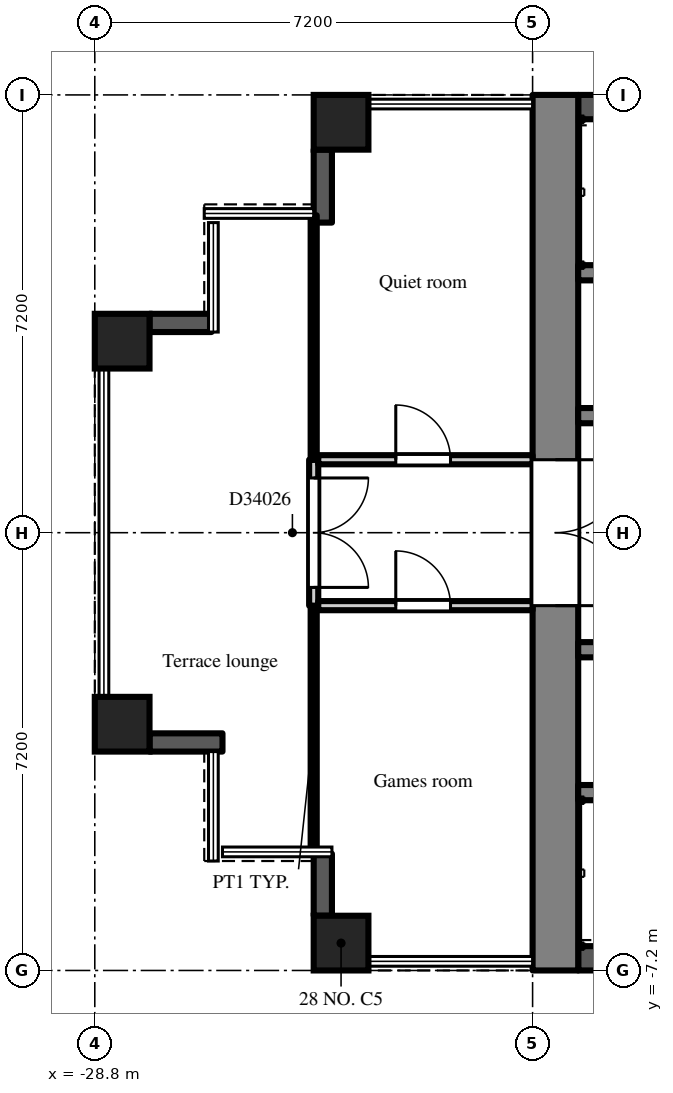
"""IFC4 building model, lengths in metres.
Left out: names, types, materials, properties, quantities, classifications, styles, units other than length and angle.
Written with IfcOpenShell. Run it as: python <this file> out.ifc"""

import sys

from ifc_helpers import new_model, si_unit, direction, frame, frame_2d, origin, origin_2d, place, context, subcontext, project, spatial, rectangle, extrude, element, fill, save


model = new_model("IFC4")
c1 = context("Model", 3, precision=1e-05, world=origin(), true_north=direction((0.0, 1.0)))
c2 = subcontext(c1, "Body", "Model", "MODEL_VIEW")
j1 = project(units=[si_unit("LENGTHUNIT", "METRE"), si_unit("PLANEANGLEUNIT", "RADIAN")], contexts=[c1])
p1 = place(None, origin())
s1 = spatial("IfcSite", under=j1, at=p1, CompositionType="ELEMENT")
p2 = place(p1, origin())
s2 = spatial("IfcBuilding", under=s1, at=p2, CompositionType="ELEMENT")
p3 = place(p2, frame((0.0, 0.0, 237.9)))
s3 = spatial("IfcBuildingStorey", under=s2, at=p3, CompositionType="ELEMENT", Elevation=237.9)
for number, where, z_axis, x_axis in (
    (1, (-28.35, -3.15, 0.0), (0.0, 0.0, 1.0), (1.0, 0.0, 0.0)),
    (2, (-28.35, 3.15, 0.0), (0.0, 0.0, 1.0), (1.0, 0.0, 0.0)),
    (3, (-24.75, -6.75, 0.0), (0.0, 0.0, 1.0), (1.0, 0.0, 0.0)),
    (4, (-24.75, 6.75, 0.0), (0.0, 0.0, 1.0), (1.0, 0.0, 0.0)),
):
    element("IfcColumn", number, at=place(p3, frame(where, z_axis=z_axis, x_axis=x_axis)), inside=s3, PredefinedType="COLUMN", context=c2, shape_type="SweptSolid", body=[
        extrude(rectangle(XDim=0.9, YDim=0.9, at=origin_2d()), origin(), (0.0, 0.0, 1.0), 4.2),
    ])
p4 = place(p3, frame((-25.05, 6.3, 0.0), z_axis=(0.0, 0.0, 1.0), x_axis=(0.0, -1.0, 0.0)))
e5 = element("IfcWall", 5, at=p4, inside=s3, PredefinedType="SOLIDWALL", context=c2, shape_type="SweptSolid", body=[
    extrude(rectangle(XDim=1.2, YDim=0.3, at=frame_2d((0.6, 0.0))), origin(), (0.0, 0.0, 1.0), 3.75),
])
p5 = place(p3, frame((-26.88, 3.45, 0.0), z_axis=(0.0, 0.0, 1.0), x_axis=(-1.0, 0.0, 0.0)))
e6 = element("IfcWall", 6, at=p5, inside=s3, PredefinedType="SOLIDWALL", context=c2, shape_type="SweptSolid", body=[
    extrude(rectangle(XDim=1.02, YDim=0.3, at=frame_2d((0.51, 0.0))), origin(), (0.0, 0.0, 1.0), 3.75),
])
p6 = place(p3, frame((-27.9, -3.45, 0.0), z_axis=(0.0, 0.0, 1.0), x_axis=(1.0, 0.0, 0.0)))
e7 = element("IfcWall", 7, at=p6, inside=s3, PredefinedType="SOLIDWALL", context=c2, shape_type="SweptSolid", body=[
    extrude(rectangle(XDim=1.2, YDim=0.3, at=frame_2d((0.6, 0.0))), origin(), (0.0, 0.0, 1.0), 3.75),
])
p7 = place(p3, frame((-25.05, -5.28, 0.0), z_axis=(0.0, 0.0, 1.0), x_axis=(0.0, -1.0, 0.0)))
e8 = element("IfcWall", 8, at=p7, inside=s3, PredefinedType="SOLIDWALL", context=c2, shape_type="SweptSolid", body=[
    extrude(rectangle(XDim=1.02, YDim=0.3, at=frame_2d((0.51, 0.0))), origin(), (0.0, 0.0, 1.0), 3.75),
])
p8 = place(p3, frame((-21.225, -7.2, 0.0), z_axis=(0.0, 0.0, 1.0), x_axis=(0.0, 1.0, 0.0)))
e9 = element("IfcWall", 9, at=p8, inside=s3, PredefinedType="SHEAR", context=c2, shape_type="SweptSolid", body=[
    extrude(rectangle(XDim=14.4, YDim=0.75, at=frame_2d((7.2, 0.0))), origin(), (0.0, 0.0, 1.0), 3.75),
])
p9 = place(p8, frame((6.0, 0.0, 0.0)))
e10 = element("IfcOpeningElement", 10, at=p9, cuts=e9, PredefinedType="OPENING", context=c2, shape_type="SweptSolid", body=[
    extrude(rectangle(XDim=2.4, YDim=2.2, at=frame_2d((1.2, 1.1))), frame((0.0, 0.385, 0.0), z_axis=(0.0, -1.0, 0.0), x_axis=(1.0, 0.0, 0.0)), (0.0, 0.0, 1.0), 0.77),
])
p10 = place(p3, frame((-7.9, 7.0, 0.0), z_axis=(0.0, 0.0, 1.0), x_axis=(-1.0, 0.0, 0.0)))
e11 = element("IfcWall", 11, at=p10, inside=s3, PredefinedType="SHEAR", context=c2, shape_type="SweptSolid", body=[
    extrude(rectangle(XDim=12.95, YDim=0.4, at=frame_2d((6.475, 0.0))), origin(), (0.0, 0.0, 1.0), 3.75),
])
p11 = place(p3, frame((-7.9, 1.925, 0.0), z_axis=(0.0, 0.0, 1.0), x_axis=(-1.0, 0.0, 0.0)))
e12 = element("IfcWall", 12, at=p11, inside=s3, PredefinedType="SHEAR", context=c2, shape_type="SweptSolid", body=[
    extrude(rectangle(XDim=12.95, YDim=0.25, at=frame_2d((6.475, 0.0))), origin(), (0.0, 0.0, 1.0), 3.75),
])
p12 = place(p11, frame((4.825, 0.0, 0.0)))
e13 = element("IfcOpeningElement", 13, at=p12, cuts=e12, PredefinedType="OPENING", context=c2, shape_type="SweptSolid", body=[
    extrude(rectangle(XDim=1.1, YDim=2.1, at=frame_2d((0.55, 1.05))), frame((0.0, 0.135, 0.0), z_axis=(0.0, -1.0, 0.0), x_axis=(1.0, 0.0, 0.0)), (0.0, 0.0, 1.0), 0.27),
])
p13 = place(p11, frame((7.025, 0.0, 0.0)))
e14 = element("IfcOpeningElement", 14, at=p13, cuts=e12, PredefinedType="OPENING", context=c2, shape_type="SweptSolid", body=[
    extrude(rectangle(XDim=1.1, YDim=2.1, at=frame_2d((0.55, 1.05))), frame((0.0, 0.135, 0.0), z_axis=(0.0, -1.0, 0.0), x_axis=(1.0, 0.0, 0.0)), (0.0, 0.0, 1.0), 0.27),
])
p14 = place(p11, frame((9.225, 0.0, 0.0)))
e15 = element("IfcOpeningElement", 15, at=p14, cuts=e12, PredefinedType="OPENING", context=c2, shape_type="SweptSolid", body=[
    extrude(rectangle(XDim=1.1, YDim=2.1, at=frame_2d((0.55, 1.05))), frame((0.0, 0.135, 0.0), z_axis=(0.0, -1.0, 0.0), x_axis=(1.0, 0.0, 0.0)), (0.0, 0.0, 1.0), 0.27),
])
p15 = place(p11, frame((0.525, 0.0, 0.0)))
e16 = element("IfcOpeningElement", 16, at=p15, cuts=e12, PredefinedType="OPENING", context=c2, shape_type="SweptSolid", body=[
    extrude(rectangle(XDim=0.9, YDim=2.1, at=frame_2d((0.45, 1.05))), frame((0.0, 0.135, 0.0), z_axis=(0.0, -1.0, 0.0), x_axis=(1.0, 0.0, 0.0)), (0.0, 0.0, 1.0), 0.27),
])
p16 = place(p11, frame((2.575, 0.0, 0.0)))
e17 = element("IfcOpeningElement", 17, at=p16, cuts=e12, PredefinedType="OPENING", context=c2, shape_type="SweptSolid", body=[
    extrude(rectangle(XDim=1.2, YDim=2.1, at=frame_2d((0.6, 1.05))), frame((0.0, 0.135, 0.0), z_axis=(0.0, -1.0, 0.0), x_axis=(1.0, 0.0, 0.0)), (0.0, 0.0, 1.0), 0.27),
])
p17 = place(p11, frame((11.525, 0.0, 0.0)))
e18 = element("IfcOpeningElement", 18, at=p17, cuts=e12, PredefinedType="OPENING", context=c2, shape_type="SweptSolid", body=[
    extrude(rectangle(XDim=0.9, YDim=2.1, at=frame_2d((0.45, 1.05))), frame((0.0, 0.135, 0.0), z_axis=(0.0, -1.0, 0.0), x_axis=(1.0, 0.0, 0.0)), (0.0, 0.0, 1.0), 0.27),
])
p18 = place(p3, frame((-12.3, 4.275, 0.0), z_axis=(0.0, 0.0, 1.0), x_axis=(-1.0, 0.0, 0.0)))
e19 = element("IfcWall", 19, at=p18, inside=s3, PredefinedType="SHEAR", context=c2, shape_type="SweptSolid", body=[
    extrude(rectangle(XDim=8.55, YDim=0.25, at=frame_2d((4.275, 0.0))), origin(), (0.0, 0.0, 1.0), 3.75),
])
p19 = place(p3, frame((-7.9, -7.0, 0.0), z_axis=(0.0, 0.0, 1.0), x_axis=(-1.0, 0.0, 0.0)))
e20 = element("IfcWall", 20, at=p19, inside=s3, PredefinedType="SHEAR", context=c2, shape_type="SweptSolid", body=[
    extrude(rectangle(XDim=12.95, YDim=0.4, at=frame_2d((6.475, 0.0))), origin(), (0.0, 0.0, 1.0), 3.75),
])
p20 = place(p3, frame((-7.9, -1.925, 0.0), z_axis=(0.0, 0.0, 1.0), x_axis=(-1.0, 0.0, 0.0)))
e21 = element("IfcWall", 21, at=p20, inside=s3, PredefinedType="SHEAR", context=c2, shape_type="SweptSolid", body=[
    extrude(rectangle(XDim=12.95, YDim=0.25, at=frame_2d((6.475, 0.0))), origin(), (0.0, 0.0, 1.0), 3.75),
])
p21 = place(p20, frame((0.525, 0.0, 0.0)))
e22 = element("IfcOpeningElement", 22, at=p21, cuts=e21, PredefinedType="OPENING", context=c2, shape_type="SweptSolid", body=[
    extrude(rectangle(XDim=0.9, YDim=2.1, at=frame_2d((0.45, 1.05))), frame((0.0, 0.135, 0.0), z_axis=(0.0, -1.0, 0.0), x_axis=(1.0, 0.0, 0.0)), (0.0, 0.0, 1.0), 0.27),
])
p22 = place(p20, frame((2.575, 0.0, 0.0)))
e23 = element("IfcOpeningElement", 23, at=p22, cuts=e21, PredefinedType="OPENING", context=c2, shape_type="SweptSolid", body=[
    extrude(rectangle(XDim=1.2, YDim=2.1, at=frame_2d((0.6, 1.05))), frame((0.0, 0.135, 0.0), z_axis=(0.0, -1.0, 0.0), x_axis=(1.0, 0.0, 0.0)), (0.0, 0.0, 1.0), 0.27),
])
p23 = place(p20, frame((6.025, 0.0, 0.0)))
e24 = element("IfcOpeningElement", 24, at=p23, cuts=e21, PredefinedType="OPENING", context=c2, shape_type="SweptSolid", body=[
    extrude(rectangle(XDim=0.9, YDim=2.1, at=frame_2d((0.45, 1.05))), frame((0.0, 0.135, 0.0), z_axis=(0.0, -1.0, 0.0), x_axis=(1.0, 0.0, 0.0)), (0.0, 0.0, 1.0), 0.27),
])
p24 = place(p20, frame((10.425, 0.0, 0.0)))
e25 = element("IfcOpeningElement", 25, at=p24, cuts=e21, PredefinedType="OPENING", context=c2, shape_type="SweptSolid", body=[
    extrude(rectangle(XDim=0.9, YDim=2.1, at=frame_2d((0.45, 1.05))), frame((0.0, 0.135, 0.0), z_axis=(0.0, -1.0, 0.0), x_axis=(1.0, 0.0, 0.0)), (0.0, 0.0, 1.0), 0.27),
])
p25 = place(p3, frame((-12.3, -4.275, 0.0), z_axis=(0.0, 0.0, 1.0), x_axis=(-1.0, 0.0, 0.0)))
e26 = element("IfcWall", 26, at=p25, inside=s3, PredefinedType="SHEAR", context=c2, shape_type="SweptSolid", body=[
    extrude(rectangle(XDim=8.55, YDim=0.25, at=frame_2d((4.275, 0.0))), origin(), (0.0, 0.0, 1.0), 3.75),
])
p26 = place(p3, frame((-25.2, -5.22, 0.0), z_axis=(0.0, 0.0, 1.0), x_axis=(0.0, 1.0, 0.0)))
e27 = element("IfcWall", 27, at=p26, inside=s3, PredefinedType="PARTITIONING", context=c2, shape_type="SweptSolid", body=[
    extrude(rectangle(XDim=4.02, YDim=0.1, at=frame_2d((2.01, 0.0))), origin(), (0.0, 0.0, 1.0), 3.75),
])
p27 = place(p3, frame((-25.2, -1.2, 0.0), z_axis=(0.0, 0.0, 1.0), x_axis=(0.0, 1.0, 0.0)))
e28 = element("IfcWall", 28, at=p27, inside=s3, PredefinedType="PARTITIONING", context=c2, shape_type="SweptSolid", body=[
    extrude(rectangle(XDim=2.4, YDim=0.15, at=frame_2d((1.2, 0.0))), origin(), (0.0, 0.0, 1.0), 3.75),
])
p28 = place(p27, frame((0.3, 0.0, 0.0)))
e29 = element("IfcOpeningElement", 29, at=p28, cuts=e28, PredefinedType="OPENING", context=c2, shape_type="SweptSolid", body=[
    extrude(rectangle(XDim=1.8, YDim=2.1, at=frame_2d((0.9, 1.05))), frame((0.0, 0.085, 0.0), z_axis=(0.0, -1.0, 0.0), x_axis=(1.0, 0.0, 0.0)), (0.0, 0.0, 1.0), 0.17),
])
p29 = place(p3, frame((-25.125, -1.2, 0.0), z_axis=(0.0, 0.0, 1.0), x_axis=(1.0, 0.0, 0.0)))
e30 = element("IfcWall", 30, at=p29, inside=s3, PredefinedType="PARTITIONING", context=c2, shape_type="SweptSolid", body=[
    extrude(rectangle(XDim=3.525, YDim=0.15, at=frame_2d((1.762, 0.0))), origin(), (0.0, 0.0, 1.0), 3.75),
])
p30 = place(p29, frame((1.275, 0.0, 0.0)))
e31 = element("IfcOpeningElement", 31, at=p30, cuts=e30, PredefinedType="OPENING", context=c2, shape_type="SweptSolid", body=[
    extrude(rectangle(XDim=0.9, YDim=2.1, at=frame_2d((0.45, 1.05))), frame((0.0, 0.085, 0.0), z_axis=(0.0, -1.0, 0.0), x_axis=(1.0, 0.0, 0.0)), (0.0, 0.0, 1.0), 0.17),
])
p31 = place(p3, frame((-25.2, 1.2, 0.0), z_axis=(0.0, 0.0, 1.0), x_axis=(0.0, 1.0, 0.0)))
e32 = element("IfcWall", 32, at=p31, inside=s3, PredefinedType="PARTITIONING", context=c2, shape_type="SweptSolid", body=[
    extrude(rectangle(XDim=4.02, YDim=0.1, at=frame_2d((2.01, 0.0))), origin(), (0.0, 0.0, 1.0), 3.75),
])
p32 = place(p3, frame((-25.125, 1.2, 0.0), z_axis=(0.0, 0.0, 1.0), x_axis=(1.0, 0.0, 0.0)))
e33 = element("IfcWall", 33, at=p32, inside=s3, PredefinedType="PARTITIONING", context=c2, shape_type="SweptSolid", body=[
    extrude(rectangle(XDim=3.525, YDim=0.15, at=frame_2d((1.762, 0.0))), origin(), (0.0, 0.0, 1.0), 3.75),
])
p33 = place(p32, frame((1.275, 0.0, 0.0)))
e34 = element("IfcOpeningElement", 34, at=p33, cuts=e33, PredefinedType="OPENING", context=c2, shape_type="SweptSolid", body=[
    extrude(rectangle(XDim=0.9, YDim=2.1, at=frame_2d((0.45, 1.05))), frame((0.0, 0.085, 0.0), z_axis=(0.0, -1.0, 0.0), x_axis=(1.0, 0.0, 0.0)), (0.0, 0.0, 1.0), 0.17),
])
p34 = place(p9, frame((2.4, 0.0, 0.0), z_axis=(0.0, 0.0, 1.0), x_axis=(-1.0, 0.0, 0.0)))
e35 = element("IfcDoor", 35, at=p34, inside=s3, OperationType="DOUBLE_DOOR_DOUBLE_SWING", PredefinedType="DOOR", context=c2, shape_type="SweptSolid", body=[
    extrude(rectangle(XDim=2.4, YDim=2.2, at=frame_2d((1.2, 1.1))), frame((0.0, 0.025, 0.0), z_axis=(0.0, -1.0, 0.0), x_axis=(1.0, 0.0, 0.0)), (0.0, 0.0, 1.0), 0.05),
])
fill(e10, e35)
p35 = place(p28, frame((1.8, 0.0, 0.0), z_axis=(0.0, 0.0, 1.0), x_axis=(-1.0, 0.0, 0.0)))
e36 = element("IfcDoor", 36, at=p35, inside=s3, OperationType="DOUBLE_DOOR_DOUBLE_SWING", PredefinedType="DOOR", context=c2, shape_type="SweptSolid", body=[
    extrude(rectangle(XDim=1.8, YDim=2.1, at=frame_2d((0.9, 1.05))), frame((0.0, 0.025, 0.0), z_axis=(0.0, -1.0, 0.0), x_axis=(1.0, 0.0, 0.0)), (0.0, 0.0, 1.0), 0.05),
])
fill(e29, e36)
p36 = place(p30, origin())
e37 = element("IfcDoor", 37, at=p36, inside=s3, OperationType="SINGLE_SWING_LEFT", PredefinedType="DOOR", context=c2, shape_type="SweptSolid", body=[
    extrude(rectangle(XDim=0.9, YDim=2.1, at=frame_2d((0.45, 1.05))), frame((0.0, 0.025, 0.0), z_axis=(0.0, -1.0, 0.0), x_axis=(1.0, 0.0, 0.0)), (0.0, 0.0, 1.0), 0.05),
])
fill(e31, e37)
p37 = place(p33, origin())
e38 = element("IfcDoor", 38, at=p37, inside=s3, OperationType="SINGLE_SWING_LEFT", PredefinedType="DOOR", context=c2, shape_type="SweptSolid", body=[
    extrude(rectangle(XDim=0.9, YDim=2.1, at=frame_2d((0.45, 1.05))), frame((0.0, 0.025, 0.0), z_axis=(0.0, -1.0, 0.0), x_axis=(1.0, 0.0, 0.0)), (0.0, 0.0, 1.0), 0.05),
])
fill(e34, e38)
save(model, sys.argv[1])
